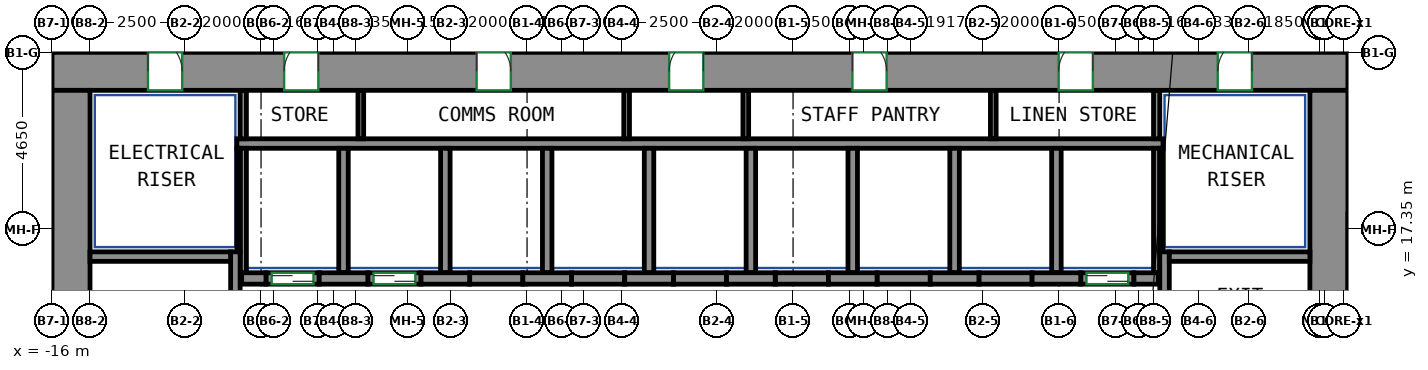
"""IFC4 building model, lengths in metres.
Left out: names, types, materials, properties, quantities, classifications, styles, units other than length and angle.
Written with IfcOpenShell. Run it as: python <this file> out.ifc"""

import sys

from ifc_helpers import new_model, si_unit, direction, frame, frame_2d, origin, place, context, subcontext, project, spatial, rectangle, extrude, source, transform, mapped, element, fill, save


model = new_model("IFC4")
c1 = context("Model", 3, precision=1e-05, world=origin(), true_north=direction((0.0, 1.0)))
c2 = subcontext(c1, "Body", "Model", "MODEL_VIEW")
j1 = project(units=[si_unit("LENGTHUNIT", "METRE"), si_unit("PLANEANGLEUNIT", "RADIAN")], contexts=[c1])
p1 = place(None, origin())
s1 = spatial("IfcSite", under=j1, at=p1, CompositionType="ELEMENT")
p2 = place(p1, origin())
s2 = spatial("IfcBuilding", under=s1, at=p2, CompositionType="ELEMENT")
p3 = place(p2, frame((0.0, 0.0, 39.0)))
s3 = spatial("IfcBuildingStorey", under=s2, at=p3, CompositionType="ELEMENT", Elevation=39.0)
m1 = source(origin(), c2, "Body", "SweptSolid", [
    extrude(rectangle(XDim=34.1, YDim=1.0, at=frame_2d((17.05, 0.0))), origin(), (0.0, 0.0, 1.0), 3.72),
])
p4 = place(p3, frame((-16.0, 21.5, 0.0), z_axis=(0.0, 0.0, 1.0), x_axis=(1.0, 0.0, 0.0)))
e1 = element("IfcWall", 1, at=p4, inside=s3, PredefinedType="SHEAR", context=c2, shape_type="MappedRepresentation", body=[
    mapped(m1, transform((0.0, 0.0, 0.0))),
])
p5 = place(p4, frame((6.108, 0.0, 0.0)))
e2 = element("IfcOpeningElement", 2, at=p5, cuts=e1, PredefinedType="OPENING", context=c2, shape_type="SweptSolid", body=[
    extrude(rectangle(XDim=0.9, YDim=2.1, at=frame_2d((0.45, 1.05))), frame((0.0, 0.51, 0.0), z_axis=(0.0, -1.0, 0.0), x_axis=(1.0, 0.0, 0.0)), (0.0, 0.0, 1.0), 1.02),
])
p6 = place(p4, frame((11.173, 0.0, 0.0)))
e3 = element("IfcOpeningElement", 3, at=p6, cuts=e1, PredefinedType="OPENING", context=c2, shape_type="SweptSolid", body=[
    extrude(rectangle(XDim=0.9, YDim=2.1, at=frame_2d((0.45, 1.05))), frame((0.0, 0.51, 0.0), z_axis=(0.0, -1.0, 0.0), x_axis=(1.0, 0.0, 0.0)), (0.0, 0.0, 1.0), 1.02),
])
p7 = place(p4, frame((16.238, 0.0, 0.0)))
e4 = element("IfcOpeningElement", 4, at=p7, cuts=e1, PredefinedType="OPENING", context=c2, shape_type="SweptSolid", body=[
    extrude(rectangle(XDim=0.9, YDim=2.1, at=frame_2d((0.45, 1.05))), frame((0.0, 0.51, 0.0), z_axis=(0.0, -1.0, 0.0), x_axis=(1.0, 0.0, 0.0)), (0.0, 0.0, 1.0), 1.02),
])
p8 = place(p4, frame((21.062, 0.0, 0.0)))
e5 = element("IfcOpeningElement", 5, at=p8, cuts=e1, PredefinedType="OPENING", context=c2, shape_type="SweptSolid", body=[
    extrude(rectangle(XDim=0.9, YDim=2.1, at=frame_2d((0.45, 1.05))), frame((0.0, 0.51, 0.0), z_axis=(0.0, -1.0, 0.0), x_axis=(1.0, 0.0, 0.0)), (0.0, 0.0, 1.0), 1.02),
])
p9 = place(p4, frame((26.489, 0.0, 0.0)))
e6 = element("IfcOpeningElement", 6, at=p9, cuts=e1, PredefinedType="OPENING", context=c2, shape_type="SweptSolid", body=[
    extrude(rectangle(XDim=0.9, YDim=2.1, at=frame_2d((0.45, 1.05))), frame((0.0, 0.51, 0.0), z_axis=(0.0, -1.0, 0.0), x_axis=(1.0, 0.0, 0.0)), (0.0, 0.0, 1.0), 1.02),
])
p10 = place(p4, frame((2.525, 0.0, 0.0)))
e7 = element("IfcOpeningElement", 7, at=p10, cuts=e1, PredefinedType="OPENING", context=c2, shape_type="SweptSolid", body=[
    extrude(rectangle(XDim=0.9, YDim=2.1, at=frame_2d((0.45, 1.05))), frame((0.0, 0.51, 0.0), z_axis=(0.0, -1.0, 0.0), x_axis=(1.0, 0.0, 0.0)), (0.0, 0.0, 1.0), 1.02),
])
p11 = place(p4, frame((30.675, 0.0, 0.0)))
e8 = element("IfcOpeningElement", 8, at=p11, cuts=e1, PredefinedType="OPENING", context=c2, shape_type="SweptSolid", body=[
    extrude(rectangle(XDim=0.9, YDim=2.1, at=frame_2d((0.45, 1.05))), frame((0.0, 0.51, 0.0), z_axis=(0.0, -1.0, 0.0), x_axis=(1.0, 0.0, 0.0)), (0.0, 0.0, 1.0), 1.02),
])
m2 = source(origin(), c2, "Body", "SweptSolid", [
    extrude(rectangle(XDim=12.0, YDim=1.0, at=frame_2d((6.0, 0.0))), origin(), (0.0, 0.0, 1.0), 3.72),
])
for number, where, z_axis, x_axis in (
    (9, (-15.5, 9.0, 0.0), (0.0, 0.0, 1.0), (0.0, 1.0, 0.0)),
    (10, (17.6, 9.0, 0.0), (0.0, 0.0, 1.0), (0.0, 1.0, 0.0)),
):
    element("IfcWall", number, at=place(p3, frame(where, z_axis=z_axis, x_axis=x_axis)), inside=s3, PredefinedType="SHEAR", context=c2, shape_type="MappedRepresentation", body=[
        mapped(m2, transform((0.0, 0.0, 0.0))),
    ])
m3 = source(origin(), c2, "Body", "SweptSolid", [
    extrude(rectangle(XDim=7.75, YDim=0.25, at=frame_2d((3.875, 0.0))), origin(), (0.0, 0.0, 1.0), 3.72),
])
p12 = place(p3, frame((-11.175, 9.0, 0.0), z_axis=(0.0, 0.0, 1.0), x_axis=(0.0, 1.0, 0.0)))
e11 = element("IfcWall", 11, at=p12, inside=s3, PredefinedType="SHEAR", context=c2, shape_type="MappedRepresentation", body=[
    mapped(m3, transform((0.0, 0.0, 0.0))),
])
m4 = source(origin(), c2, "Body", "SweptSolid", [
    extrude(rectangle(XDim=3.7, YDim=0.25, at=frame_2d((1.85, 0.0))), origin(), (0.0, 0.0, 1.0), 3.72),
])
p13 = place(p3, frame((-15.0, 16.625, 0.0), z_axis=(0.0, 0.0, 1.0), x_axis=(1.0, 0.0, 0.0)))
e12 = element("IfcWall", 12, at=p13, inside=s3, PredefinedType="SHEAR", context=c2, shape_type="MappedRepresentation", body=[
    mapped(m4, transform((0.0, 0.0, 0.0))),
])
p14 = place(p3, frame((13.275, 9.0, 0.0), z_axis=(0.0, 0.0, 1.0), x_axis=(0.0, 1.0, 0.0)))
e13 = element("IfcWall", 13, at=p14, inside=s3, PredefinedType="SHEAR", context=c2, shape_type="MappedRepresentation", body=[
    mapped(m3, transform((0.0, 0.0, 0.0))),
])
m5 = source(origin(), c2, "Body", "SweptSolid", [
    extrude(rectangle(XDim=3.7, YDim=0.25, at=frame_2d((1.85, 0.0))), origin(), (0.0, 0.0, 1.0), 3.72),
])
p15 = place(p3, frame((13.4, 16.625, 0.0), z_axis=(0.0, 0.0, 1.0), x_axis=(1.0, 0.0, 0.0)))
e14 = element("IfcWall", 14, at=p15, inside=s3, PredefinedType="SHEAR", context=c2, shape_type="MappedRepresentation", body=[
    mapped(m5, transform((0.0, 0.0, 0.0))),
])
m6 = source(origin(), c2, "Body", "SweptSolid", [
    extrude(rectangle(XDim=0.64, YDim=0.3, at=frame_2d((0.32, 0.0))), origin(), (0.0, 0.0, 1.0), 3.72),
])
p16 = place(p3, frame((-11.01, 16.05, 0.0), z_axis=(0.0, 0.0, 1.0), x_axis=(1.0, 0.0, 0.0)))
e15 = element("IfcWall", 15, at=p16, inside=s3, PredefinedType="SHEAR", context=c2, shape_type="MappedRepresentation", body=[
    mapped(m6, transform((0.0, 0.0, 0.0))),
])
m7 = source(origin(), c2, "Body", "SweptSolid", [
    extrude(rectangle(XDim=1.28, YDim=0.3, at=frame_2d((0.64, 0.0))), origin(), (0.0, 0.0, 1.0), 3.72),
])
for number, where, z_axis, x_axis in (
    (16, (-8.97, 16.05, 0.0), (0.0, 0.0, 1.0), (1.0, 0.0, 0.0)),
    (17, (-6.29, 16.05, 0.0), (0.0, 0.0, 1.0), (1.0, 0.0, 0.0)),
    (18, (-3.61, 16.05, 0.0), (0.0, 0.0, 1.0), (1.0, 0.0, 0.0)),
    (19, (-0.93, 16.05, 0.0), (0.0, 0.0, 1.0), (1.0, 0.0, 0.0)),
    (20, (1.75, 16.05, 0.0), (0.0, 0.0, 1.0), (1.0, 0.0, 0.0)),
    (21, (4.43, 16.05, 0.0), (0.0, 0.0, 1.0), (1.0, 0.0, 0.0)),
):
    element("IfcWall", number, at=place(p3, frame(where, z_axis=z_axis, x_axis=x_axis)), inside=s3, PredefinedType="SHEAR", context=c2, shape_type="MappedRepresentation", body=[
        mapped(m7, transform((0.0, 0.0, 0.0))),
    ])
m8 = source(origin(), c2, "Body", "SweptSolid", [
    extrude(rectangle(XDim=1.28, YDim=0.3, at=frame_2d((0.64, 0.0))), origin(), (0.0, 0.0, 1.0), 3.72),
])
p17 = place(p3, frame((7.11, 16.05, 0.0), z_axis=(0.0, 0.0, 1.0), x_axis=(1.0, 0.0, 0.0)))
e22 = element("IfcWall", 22, at=p17, inside=s3, PredefinedType="SHEAR", context=c2, shape_type="MappedRepresentation", body=[
    mapped(m8, transform((0.0, 0.0, 0.0))),
])
p18 = place(p3, frame((9.79, 16.05, 0.0), z_axis=(0.0, 0.0, 1.0), x_axis=(1.0, 0.0, 0.0)))
e23 = element("IfcWall", 23, at=p18, inside=s3, PredefinedType="SHEAR", context=c2, shape_type="MappedRepresentation", body=[
    mapped(m7, transform((0.0, 0.0, 0.0))),
])
m9 = source(origin(), c2, "Body", "SweptSolid", [
    extrude(rectangle(XDim=0.64, YDim=0.3, at=frame_2d((0.32, 0.0))), origin(), (0.0, 0.0, 1.0), 3.72),
])
p19 = place(p3, frame((12.47, 16.05, 0.0), z_axis=(0.0, 0.0, 1.0), x_axis=(1.0, 0.0, 0.0)))
e24 = element("IfcWall", 24, at=p19, inside=s3, PredefinedType="SHEAR", context=c2, shape_type="MappedRepresentation", body=[
    mapped(m9, transform((0.0, 0.0, 0.0))),
])
m10 = source(origin(), c2, "Body", "SweptSolid", [
    extrude(rectangle(XDim=1.4, YDim=0.3, at=frame_2d((0.7, 0.0))), origin(), (0.0, 0.0, 1.0), 3.72),
])
p20 = place(p3, frame((11.07, 16.05, 0.0), z_axis=(0.0, 0.0, 1.0), x_axis=(1.0, 0.0, 0.0)))
e25 = element("IfcWall", 25, at=p20, inside=s3, PredefinedType="PARTITIONING", context=c2, shape_type="MappedRepresentation", body=[
    mapped(m10, transform((0.0, 0.0, 0.0))),
])
p21 = place(p20, frame((0.15, 0.0, 0.0)))
e26 = element("IfcOpeningElement", 26, at=p21, cuts=e25, PredefinedType="OPENING", context=c2, shape_type="SweptSolid", body=[
    extrude(rectangle(XDim=1.1, YDim=2.1, at=frame_2d((0.55, 1.05))), frame((0.0, 0.16, 0.0), z_axis=(0.0, -1.0, 0.0), x_axis=(1.0, 0.0, 0.0)), (0.0, 0.0, 1.0), 0.32),
])
m11 = source(origin(), c2, "Body", "SweptSolid", [
    extrude(rectangle(XDim=1.4, YDim=0.3, at=frame_2d((0.7, 0.0))), origin(), (0.0, 0.0, 1.0), 3.72),
])
p22 = place(p3, frame((-10.37, 16.05, 0.0), z_axis=(0.0, 0.0, 1.0), x_axis=(1.0, 0.0, 0.0)))
e27 = element("IfcWall", 27, at=p22, inside=s3, PredefinedType="PARTITIONING", context=c2, shape_type="MappedRepresentation", body=[
    mapped(m11, transform((0.0, 0.0, 0.0))),
])
p23 = place(p22, frame((0.15, 0.0, 0.0)))
e28 = element("IfcOpeningElement", 28, at=p23, cuts=e27, PredefinedType="OPENING", context=c2, shape_type="SweptSolid", body=[
    extrude(rectangle(XDim=1.1, YDim=2.1, at=frame_2d((0.55, 1.05))), frame((0.0, 0.16, 0.0), z_axis=(0.0, -1.0, 0.0), x_axis=(1.0, 0.0, 0.0)), (0.0, 0.0, 1.0), 0.32),
])
p24 = place(p3, frame((-7.69, 16.05, 0.0), z_axis=(0.0, 0.0, 1.0), x_axis=(1.0, 0.0, 0.0)))
e29 = element("IfcWall", 29, at=p24, inside=s3, PredefinedType="PARTITIONING", context=c2, shape_type="MappedRepresentation", body=[
    mapped(m10, transform((0.0, 0.0, 0.0))),
])
p25 = place(p24, frame((0.15, 0.0, 0.0)))
e30 = element("IfcOpeningElement", 30, at=p25, cuts=e29, PredefinedType="OPENING", context=c2, shape_type="SweptSolid", body=[
    extrude(rectangle(XDim=1.1, YDim=2.1, at=frame_2d((0.55, 1.05))), frame((0.0, 0.16, 0.0), z_axis=(0.0, -1.0, 0.0), x_axis=(1.0, 0.0, 0.0)), (0.0, 0.0, 1.0), 0.32),
])
p26 = place(p3, frame((-5.01, 16.05, 0.0), z_axis=(0.0, 0.0, 1.0), x_axis=(1.0, 0.0, 0.0)))
e31 = element("IfcWall", 31, at=p26, inside=s3, PredefinedType="PARTITIONING", context=c2, shape_type="MappedRepresentation", body=[
    mapped(m10, transform((0.0, 0.0, 0.0))),
])
p27 = place(p3, frame((-2.33, 16.05, 0.0), z_axis=(0.0, 0.0, 1.0), x_axis=(1.0, 0.0, 0.0)))
e32 = element("IfcWall", 32, at=p27, inside=s3, PredefinedType="PARTITIONING", context=c2, shape_type="MappedRepresentation", body=[
    mapped(m11, transform((0.0, 0.0, 0.0))),
])
for number, where, z_axis, x_axis in (
    (33, (0.35, 16.05, 0.0), (0.0, 0.0, 1.0), (1.0, 0.0, 0.0)),
    (34, (3.03, 16.05, 0.0), (0.0, 0.0, 1.0), (1.0, 0.0, 0.0)),
):
    element("IfcWall", number, at=place(p3, frame(where, z_axis=z_axis, x_axis=x_axis)), inside=s3, PredefinedType="PARTITIONING", context=c2, shape_type="MappedRepresentation", body=[
        mapped(m10, transform((0.0, 0.0, 0.0))),
    ])
for number, where, z_axis, x_axis in (
    (35, (5.71, 16.05, 0.0), (0.0, 0.0, 1.0), (1.0, 0.0, 0.0)),
    (36, (8.39, 16.05, 0.0), (0.0, 0.0, 1.0), (1.0, 0.0, 0.0)),
):
    element("IfcWall", number, at=place(p3, frame(where, z_axis=z_axis, x_axis=x_axis)), inside=s3, PredefinedType="PARTITIONING", context=c2, shape_type="MappedRepresentation", body=[
        mapped(m11, transform((0.0, 0.0, 0.0))),
    ])
m12 = source(origin(), c2, "Body", "SweptSolid", [
    extrude(rectangle(XDim=24.37, YDim=0.25, at=frame_2d((12.185, 0.0))), origin(), (0.0, 0.0, 1.0), 3.72),
])
p28 = place(p3, frame((-11.135, 19.6, 0.0), z_axis=(0.0, 0.0, 1.0), x_axis=(1.0, 0.0, 0.0)))
e37 = element("IfcWall", 37, at=p28, inside=s3, PredefinedType="PARTITIONING", context=c2, shape_type="MappedRepresentation", body=[
    mapped(m12, transform((0.0, 0.0, 0.0))),
])
m13 = source(origin(), c2, "Body", "SweptSolid", [
    extrude(rectangle(XDim=3.275, YDim=0.165, at=frame_2d((1.638, 0.0))), origin(), (0.0, 0.0, 1.0), 3.72),
])
p29 = place(p3, frame((13.067, 16.2, 0.0), z_axis=(0.0, 0.0, 1.0), x_axis=(0.0, 1.0, 0.0)))
e38 = element("IfcWall", 38, at=p29, inside=s3, PredefinedType="PARTITIONING", context=c2, shape_type="MappedRepresentation", body=[
    mapped(m13, transform((0.0, 0.0, 0.0))),
])
m14 = source(origin(), c2, "Body", "SweptSolid", [
    extrude(rectangle(XDim=1.275, YDim=0.165, at=frame_2d((0.637, 0.0))), origin(), (0.0, 0.0, 1.0), 3.72),
])
p30 = place(p3, frame((13.067, 19.725, 0.0), z_axis=(0.0, 0.0, 1.0), x_axis=(0.0, 1.0, 0.0)))
e39 = element("IfcWall", 39, at=p30, inside=s3, PredefinedType="PARTITIONING", context=c2, shape_type="MappedRepresentation", body=[
    mapped(m14, transform((0.0, 0.0, 0.0))),
])
p31 = place(p3, frame((-10.968, 16.2, 0.0), z_axis=(0.0, 0.0, 1.0), x_axis=(0.0, 1.0, 0.0)))
e40 = element("IfcWall", 40, at=p31, inside=s3, PredefinedType="PARTITIONING", context=c2, shape_type="MappedRepresentation", body=[
    mapped(m13, transform((0.0, 0.0, 0.0))),
])
p32 = place(p3, frame((-10.968, 19.725, 0.0), z_axis=(0.0, 0.0, 1.0), x_axis=(0.0, 1.0, 0.0)))
e41 = element("IfcWall", 41, at=p32, inside=s3, PredefinedType="PARTITIONING", context=c2, shape_type="MappedRepresentation", body=[
    mapped(m14, transform((0.0, 0.0, 0.0))),
])
m15 = source(origin(), c2, "Body", "SweptSolid", [
    extrude(rectangle(XDim=3.275, YDim=0.25, at=frame_2d((1.638, 0.0))), origin(), (0.0, 0.0, 1.0), 3.72),
])
p33 = place(p3, frame((10.43, 16.2, 0.0), z_axis=(0.0, 0.0, 1.0), x_axis=(0.0, 1.0, 0.0)))
e42 = element("IfcWall", 42, at=p33, inside=s3, PredefinedType="PARTITIONING", context=c2, shape_type="MappedRepresentation", body=[
    mapped(m15, transform((0.0, 0.0, 0.0))),
])
m16 = source(origin(), c2, "Body", "SweptSolid", [
    extrude(rectangle(XDim=2.725, YDim=0.085, at=frame_2d((1.363, 0.0))), origin(), (0.0, 0.0, 1.0), 3.72),
])
p34 = place(p3, frame((13.192, 16.75, 0.0), z_axis=(0.0, 0.0, 1.0), x_axis=(0.0, 1.0, 0.0)))
e43 = element("IfcWall", 43, at=p34, inside=s3, PredefinedType="PARTITIONING", context=c2, shape_type="MappedRepresentation", body=[
    mapped(m16, transform((0.0, 0.0, 0.0))),
])
for number, where, z_axis, x_axis in (
    (44, (2.39, 16.2, 0.0), (0.0, 0.0, 1.0), (0.0, 1.0, 0.0)),
    (45, (5.07, 16.2, 0.0), (0.0, 0.0, 1.0), (0.0, 1.0, 0.0)),
    (46, (7.75, 16.2, 0.0), (0.0, 0.0, 1.0), (0.0, 1.0, 0.0)),
    (47, (-0.29, 16.2, 0.0), (0.0, 0.0, 1.0), (0.0, 1.0, 0.0)),
):
    element("IfcWall", number, at=place(p3, frame(where, z_axis=z_axis, x_axis=x_axis)), inside=s3, PredefinedType="PARTITIONING", context=c2, shape_type="MappedRepresentation", body=[
        mapped(m15, transform((0.0, 0.0, 0.0))),
    ])
p35 = place(p3, frame((-11.093, 16.75, 0.0), z_axis=(0.0, 0.0, 1.0), x_axis=(0.0, 1.0, 0.0)))
e48 = element("IfcWall", 48, at=p35, inside=s3, PredefinedType="PARTITIONING", context=c2, shape_type="MappedRepresentation", body=[
    mapped(m16, transform((0.0, 0.0, 0.0))),
])
for number, where, z_axis, x_axis in (
    (49, (-2.97, 16.2, 0.0), (0.0, 0.0, 1.0), (0.0, 1.0, 0.0)),
    (50, (-5.65, 16.2, 0.0), (0.0, 0.0, 1.0), (0.0, 1.0, 0.0)),
    (51, (-8.33, 16.2, 0.0), (0.0, 0.0, 1.0), (0.0, 1.0, 0.0)),
):
    element("IfcWall", number, at=place(p3, frame(where, z_axis=z_axis, x_axis=x_axis)), inside=s3, PredefinedType="PARTITIONING", context=c2, shape_type="MappedRepresentation", body=[
        mapped(m15, transform((0.0, 0.0, 0.0))),
    ])
m17 = source(origin(), c2, "Body", "SweptSolid", [
    extrude(rectangle(XDim=1.275, YDim=0.15, at=frame_2d((0.637, 0.0))), origin(), (0.0, 0.0, 1.0), 3.72),
])
for number, where, z_axis, x_axis in (
    (52, (-7.875, 19.725, 0.0), (0.0, 0.0, 1.0), (0.0, 1.0, 0.0)),
    (53, (-0.88, 19.725, 0.0), (0.0, 0.0, 1.0), (0.0, 1.0, 0.0)),
    (54, (2.256, 19.725, 0.0), (0.0, 0.0, 1.0), (0.0, 1.0, 0.0)),
    (55, (8.768, 19.725, 0.0), (0.0, 0.0, 1.0), (0.0, 1.0, 0.0)),
):
    element("IfcWall", number, at=place(p3, frame(where, z_axis=z_axis, x_axis=x_axis)), inside=s3, PredefinedType="PARTITIONING", context=c2, shape_type="MappedRepresentation", body=[
        mapped(m17, transform((0.0, 0.0, 0.0))),
    ])
p36 = place(p21, origin())
e56 = element("IfcDoor", 56, at=p36, inside=s3, OperationType="DOUBLE_DOOR_SLIDING", PredefinedType="DOOR", context=c2, shape_type="SweptSolid", body=[
    extrude(rectangle(XDim=1.1, YDim=2.1, at=frame_2d((0.55, 1.05))), frame((0.0, 0.025, 0.0), z_axis=(0.0, -1.0, 0.0), x_axis=(1.0, 0.0, 0.0)), (0.0, 0.0, 1.0), 0.05),
])
fill(e26, e56)
p37 = place(p23, origin())
e57 = element("IfcDoor", 57, at=p37, inside=s3, OperationType="DOUBLE_DOOR_SLIDING", PredefinedType="DOOR", context=c2, shape_type="SweptSolid", body=[
    extrude(rectangle(XDim=1.1, YDim=2.1, at=frame_2d((0.55, 1.05))), frame((0.0, 0.025, 0.0), z_axis=(0.0, -1.0, 0.0), x_axis=(1.0, 0.0, 0.0)), (0.0, 0.0, 1.0), 0.05),
])
fill(e28, e57)
p38 = place(p25, origin())
e58 = element("IfcDoor", 58, at=p38, inside=s3, OperationType="DOUBLE_DOOR_SLIDING", PredefinedType="DOOR", context=c2, shape_type="SweptSolid", body=[
    extrude(rectangle(XDim=1.1, YDim=2.1, at=frame_2d((0.55, 1.05))), frame((0.0, 0.025, 0.0), z_axis=(0.0, -1.0, 0.0), x_axis=(1.0, 0.0, 0.0)), (0.0, 0.0, 1.0), 0.05),
])
fill(e30, e58)
p39 = place(p5, origin())
e59 = element("IfcDoor", 59, at=p39, inside=s3, OperationType="SINGLE_SWING_RIGHT", PredefinedType="DOOR", context=c2, shape_type="SweptSolid", body=[
    extrude(rectangle(XDim=0.9, YDim=2.1, at=frame_2d((0.45, 1.05))), frame((0.0, -0.355, 0.0), z_axis=(0.0, -1.0, 0.0), x_axis=(1.0, 0.0, 0.0)), (0.0, 0.0, 1.0), 0.05),
])
fill(e2, e59)
p40 = place(p6, origin())
e60 = element("IfcDoor", 60, at=p40, inside=s3, OperationType="SINGLE_SWING_LEFT", PredefinedType="DOOR", context=c2, shape_type="SweptSolid", body=[
    extrude(rectangle(XDim=0.9, YDim=2.1, at=frame_2d((0.45, 1.05))), frame((0.0, -0.355, 0.0), z_axis=(0.0, -1.0, 0.0), x_axis=(1.0, 0.0, 0.0)), (0.0, 0.0, 1.0), 0.05),
])
fill(e3, e60)
p41 = place(p7, origin())
e61 = element("IfcDoor", 61, at=p41, inside=s3, OperationType="SINGLE_SWING_RIGHT", PredefinedType="DOOR", context=c2, shape_type="SweptSolid", body=[
    extrude(rectangle(XDim=0.9, YDim=2.1, at=frame_2d((0.45, 1.05))), frame((0.0, -0.355, 0.0), z_axis=(0.0, -1.0, 0.0), x_axis=(1.0, 0.0, 0.0)), (0.0, 0.0, 1.0), 0.05),
])
fill(e4, e61)
p42 = place(p8, origin())
e62 = element("IfcDoor", 62, at=p42, inside=s3, OperationType="SINGLE_SWING_LEFT", PredefinedType="DOOR", context=c2, shape_type="SweptSolid", body=[
    extrude(rectangle(XDim=0.9, YDim=2.1, at=frame_2d((0.45, 1.05))), frame((0.0, -0.355, 0.0), z_axis=(0.0, -1.0, 0.0), x_axis=(1.0, 0.0, 0.0)), (0.0, 0.0, 1.0), 0.05),
])
fill(e5, e62)
p43 = place(p9, origin())
e63 = element("IfcDoor", 63, at=p43, inside=s3, OperationType="SINGLE_SWING_RIGHT", PredefinedType="DOOR", context=c2, shape_type="SweptSolid", body=[
    extrude(rectangle(XDim=0.9, YDim=2.1, at=frame_2d((0.45, 1.05))), frame((0.0, -0.355, 0.0), z_axis=(0.0, -1.0, 0.0), x_axis=(1.0, 0.0, 0.0)), (0.0, 0.0, 1.0), 0.05),
])
fill(e6, e63)
p44 = place(p10, origin())
e64 = element("IfcDoor", 64, at=p44, inside=s3, OperationType="SINGLE_SWING_LEFT", PredefinedType="DOOR", context=c2, shape_type="SweptSolid", body=[
    extrude(rectangle(XDim=0.9, YDim=2.1, at=frame_2d((0.45, 1.05))), frame((0.0, -0.355, 0.0), z_axis=(0.0, -1.0, 0.0), x_axis=(1.0, 0.0, 0.0)), (0.0, 0.0, 1.0), 0.05),
])
fill(e7, e64)
p45 = place(p11, origin())
e65 = element("IfcDoor", 65, at=p45, inside=s3, OperationType="SINGLE_SWING_RIGHT", PredefinedType="DOOR", context=c2, shape_type="SweptSolid", body=[
    extrude(rectangle(XDim=0.9, YDim=2.1, at=frame_2d((0.45, 1.05))), frame((0.0, -0.355, 0.0), z_axis=(0.0, -1.0, 0.0), x_axis=(1.0, 0.0, 0.0)), (0.0, 0.0, 1.0), 0.05),
])
fill(e8, e65)
save(model, sys.argv[1])
